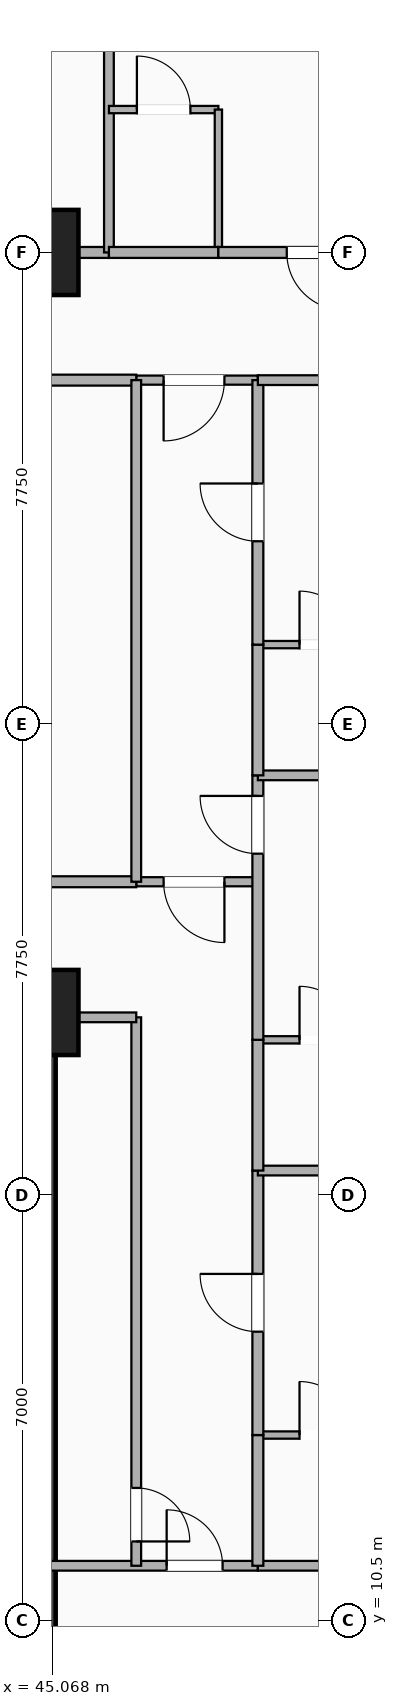
"""IFC4 building model, lengths in metres.
Left out: names, types, materials, properties, quantities, classifications, styles, units other than length and angle.
Written with IfcOpenShell. Run it as: python <this file> out.ifc"""

import sys

from ifc_helpers import new_model, si_unit, direction, frame, frame_2d, origin, origin_2d, place, context, subcontext, project, spatial, rectangle, extrude, element, fill, save


model = new_model("IFC4")
c1 = context("Model", 3, precision=1e-05, world=origin(), true_north=direction((0.0, 1.0)))
c2 = subcontext(c1, "Body", "Model", "MODEL_VIEW")
j1 = project(units=[si_unit("LENGTHUNIT", "METRE"), si_unit("PLANEANGLEUNIT", "RADIAN")], contexts=[c1])
p1 = place(None, origin())
s1 = spatial("IfcSite", under=j1, at=p1, CompositionType="ELEMENT")
p2 = place(p1, origin())
s2 = spatial("IfcBuilding", under=s1, at=p2, CompositionType="ELEMENT")
p3 = place(p2, frame((0.0, 0.0, 50.9)))
s3 = spatial("IfcBuildingStorey", under=s2, at=p3, CompositionType="ELEMENT", Elevation=50.9)
p4 = place(p3, frame((44.8, 3.5, 0.0), z_axis=(0.0, 0.0, 1.0), x_axis=(0.0, 1.0, 0.0)))
e1 = element("IfcWall", 1, at=p4, inside=s3, PredefinedType="SHEAR", context=c2, shape_type="SweptSolid", body=[
    extrude(rectangle(XDim=16.9, YDim=0.65, at=frame_2d((8.45, 0.0))), origin(), (0.0, 0.0, 1.0), 3.22),
])
for number, where, z_axis, x_axis in (
    (2, (44.8, 20.5, -0.28), (0.0, 0.0, 1.0), (1.0, 0.0, 0.0)),
    (3, (44.8, 33.0, -0.28), (0.0, 0.0, 1.0), (1.0, 0.0, 0.0)),
):
    element("IfcColumn", number, at=place(p3, frame(where, z_axis=z_axis, x_axis=x_axis)), inside=s3, PredefinedType="COLUMN", context=c2, shape_type="SweptSolid", body=[
        extrude(rectangle(XDim=1.4, YDim=1.4, at=origin_2d()), origin(), (0.0, 0.0, 1.0), 3.5),
    ])
p5 = place(p3, frame((44.8, 11.4, 0.0), z_axis=(0.0, 0.0, 1.0), x_axis=(1.0, 0.0, 0.0)))
e4 = element("IfcWall", 4, at=p5, inside=s3, PredefinedType="PARTITIONING", context=c2, shape_type="SweptSolid", body=[
    extrude(rectangle(XDim=3.65, YDim=0.16, at=frame_2d((1.825, 0.0))), origin(), (0.0, 0.0, 1.0), 2.51),
])
p6 = place(p5, frame((3.07, 0.0, 0.0), z_axis=(0.0, 0.0, 1.0), x_axis=(-1.0, 0.0, 0.0)))
e5 = element("IfcOpeningElement", 5, at=p6, cuts=e4, PredefinedType="OPENING", context=c2, shape_type="SweptSolid", body=[
    extrude(rectangle(XDim=0.92, YDim=2.08, at=frame_2d((0.46, 1.04))), frame((0.0, 0.09, 0.0), z_axis=(0.0, -1.0, 0.0), x_axis=(1.0, 0.0, 0.0)), (0.0, 0.0, 1.0), 0.18),
])
p7 = place(p3, frame((46.45, 11.4, 0.0), z_axis=(0.0, 0.0, 1.0), x_axis=(0.0, 1.0, 0.0)))
e6 = element("IfcWall", 6, at=p7, inside=s3, PredefinedType="PARTITIONING", context=c2, shape_type="SweptSolid", body=[
    extrude(rectangle(XDim=9.02, YDim=0.16, at=frame_2d((4.51, 0.0))), origin(), (0.0, 0.0, 1.0), 2.51),
])
p8 = place(p7, frame((0.4, 0.0, 0.0)))
e7 = element("IfcOpeningElement", 7, at=p8, cuts=e6, PredefinedType="OPENING", context=c2, shape_type="SweptSolid", body=[
    extrude(rectangle(XDim=0.88, YDim=2.08, at=frame_2d((0.44, 1.04))), frame((0.0, 0.09, 0.0), z_axis=(0.0, -1.0, 0.0), x_axis=(1.0, 0.0, 0.0)), (0.0, 0.0, 1.0), 0.18),
])
p9 = place(p3, frame((44.8, 20.42, 0.0), z_axis=(0.0, 0.0, 1.0), x_axis=(1.0, 0.0, 0.0)))
e8 = element("IfcWall", 8, at=p9, inside=s3, PredefinedType="PARTITIONING", context=c2, shape_type="SweptSolid", body=[
    extrude(rectangle(XDim=1.65, YDim=0.16, at=frame_2d((0.825, 0.0))), origin(), (0.0, 0.0, 1.0), 2.51),
])
p10 = place(p3, frame((46.45, 22.65, 0.0), z_axis=(0.0, 0.0, 1.0), x_axis=(1.0, 0.0, 0.0)))
e9 = element("IfcWall", 9, at=p10, inside=s3, PredefinedType="PARTITIONING", context=c2, shape_type="SweptSolid", body=[
    extrude(rectangle(XDim=2.0, YDim=0.15, at=frame_2d((1.0, 0.0))), origin(), (0.0, 0.0, 1.0), 3.22),
])
p11 = place(p10, frame((0.45, 0.0, 0.0)))
e10 = element("IfcOpeningElement", 10, at=p11, cuts=e9, PredefinedType="OPENING", context=c2, shape_type="SweptSolid", body=[
    extrude(rectangle(XDim=1.0, YDim=2.15, at=frame_2d((0.5, 1.075))), frame((0.0, 0.085, 0.0), z_axis=(0.0, -1.0, 0.0), x_axis=(1.0, 0.0, 0.0)), (0.0, 0.0, 1.0), 0.17),
])
p12 = place(p3, frame((46.45, 30.9, 0.0), z_axis=(0.0, 0.0, 1.0), x_axis=(1.0, 0.0, 0.0)))
e11 = element("IfcWall", 11, at=p12, inside=s3, PredefinedType="PARTITIONING", context=c2, shape_type="SweptSolid", body=[
    extrude(rectangle(XDim=2.0, YDim=0.15, at=frame_2d((1.0, 0.0))), origin(), (0.0, 0.0, 1.0), 3.22),
])
p13 = place(p12, frame((0.45, 0.0, 0.0)))
e12 = element("IfcOpeningElement", 12, at=p13, cuts=e11, PredefinedType="OPENING", context=c2, shape_type="SweptSolid", body=[
    extrude(rectangle(XDim=1.0, YDim=2.15, at=frame_2d((0.5, 1.075))), frame((0.0, 0.085, 0.0), z_axis=(0.0, -1.0, 0.0), x_axis=(1.0, 0.0, 0.0)), (0.0, 0.0, 1.0), 0.17),
])
p14 = place(p3, frame((40.9, 22.65, 0.0), z_axis=(0.0, 0.0, 1.0), x_axis=(1.0, 0.0, 0.0)))
e13 = element("IfcWall", 13, at=p14, inside=s3, PredefinedType="PARTITIONING", context=c2, shape_type="SweptSolid", body=[
    extrude(rectangle(XDim=5.55, YDim=0.18, at=frame_2d((2.775, 0.0))), origin(), (0.0, 0.0, 1.0), 2.51),
])
p15 = place(p14, frame((2.3, 0.0, 0.0)))
e14 = element("IfcOpeningElement", 14, at=p15, cuts=e13, PredefinedType="OPENING", context=c2, shape_type="SweptSolid", body=[
    extrude(rectangle(XDim=0.95, YDim=2.15, at=frame_2d((0.475, 1.075))), frame((0.0, 0.1, 0.0), z_axis=(0.0, -1.0, 0.0), x_axis=(1.0, 0.0, 0.0)), (0.0, 0.0, 1.0), 0.2),
])
p16 = place(p3, frame((40.9, 30.9, 0.0), z_axis=(0.0, 0.0, 1.0), x_axis=(1.0, 0.0, 0.0)))
e15 = element("IfcWall", 15, at=p16, inside=s3, PredefinedType="PARTITIONING", context=c2, shape_type="SweptSolid", body=[
    extrude(rectangle(XDim=5.55, YDim=0.18, at=frame_2d((2.775, 0.0))), origin(), (0.0, 0.0, 1.0), 2.51),
])
p17 = place(p3, frame((46.45, 22.65, 0.0), z_axis=(0.0, 0.0, 1.0), x_axis=(0.0, 1.0, 0.0)))
e16 = element("IfcWall", 16, at=p17, inside=s3, PredefinedType="PARTITIONING", context=c2, shape_type="SweptSolid", body=[
    extrude(rectangle(XDim=8.25, YDim=0.16, at=frame_2d((4.125, 0.0))), origin(), (0.0, 0.0, 1.0), 2.788),
])
p18 = place(p3, frame((38.273, 33.0, 0.0), z_axis=(0.0, 0.0, 1.0), x_axis=(1.0, 0.0, 0.0)))
e17 = element("IfcWall", 17, at=p18, inside=s3, PredefinedType="PARTITIONING", context=c2, shape_type="SweptSolid", body=[
    extrude(rectangle(XDim=7.728, YDim=0.18, at=frame_2d((3.864, 0.0))), origin(), (0.0, 0.0, 1.0), 2.51),
])
p19 = place(p18, frame((3.389, 0.0, 0.0)))
e18 = element("IfcOpeningElement", 18, at=p19, cuts=e17, PredefinedType="OPENING", context=c2, shape_type="SweptSolid", body=[
    extrude(rectangle(XDim=0.95, YDim=2.15, at=frame_2d((0.475, 1.075))), frame((0.0, 0.1, 0.0), z_axis=(0.0, -1.0, 0.0), x_axis=(1.0, 0.0, 0.0)), (0.0, 0.0, 1.0), 0.2),
])
p20 = place(p3, frame((46.001, 33.0, 0.0), z_axis=(0.0, 0.0, 1.0), x_axis=(0.0, 1.0, 0.0)))
e19 = element("IfcWall", 19, at=p20, inside=s3, PredefinedType="PARTITIONING", context=c2, shape_type="SweptSolid", body=[
    extrude(rectangle(XDim=15.38, YDim=0.16, at=frame_2d((7.69, 0.0))), origin(), (0.0, 0.0, 1.0), 2.51),
])
p21 = place(p3, frame((46.001, 35.35, 0.0), z_axis=(0.0, 0.0, 1.0), x_axis=(1.0, 0.0, 0.0)))
e20 = element("IfcWall", 20, at=p21, inside=s3, PredefinedType="PARTITIONING", context=c2, shape_type="SweptSolid", body=[
    extrude(rectangle(XDim=1.8, YDim=0.12, at=frame_2d((0.9, 0.0))), origin(), (0.0, 0.0, 1.0), 3.22),
])
p22 = place(p21, frame((1.34, 0.0, 0.0), z_axis=(0.0, 0.0, 1.0), x_axis=(-1.0, 0.0, 0.0)))
e21 = element("IfcOpeningElement", 21, at=p22, cuts=e20, PredefinedType="OPENING", context=c2, shape_type="SweptSolid", body=[
    extrude(rectangle(XDim=0.88, YDim=2.08, at=frame_2d((0.44, 1.04))), frame((0.0, 0.07, 0.0), z_axis=(0.0, -1.0, 0.0), x_axis=(1.0, 0.0, 0.0)), (0.0, 0.0, 1.0), 0.14),
])
p23 = place(p3, frame((47.801, 33.0, 0.0), z_axis=(0.0, 0.0, 1.0), x_axis=(0.0, 1.0, 0.0)))
e22 = element("IfcWall", 22, at=p23, inside=s3, PredefinedType="PARTITIONING", context=c2, shape_type="SweptSolid", body=[
    extrude(rectangle(XDim=2.35, YDim=0.12, at=frame_2d((1.175, 0.0))), origin(), (0.0, 0.0, 1.0), 2.51),
])
p24 = place(p3, frame((46.001, 33.0, 0.0), z_axis=(0.0, 0.0, 1.0), x_axis=(1.0, 0.0, 0.0)))
e23 = element("IfcWall", 23, at=p24, inside=s3, PredefinedType="PARTITIONING", context=c2, shape_type="SweptSolid", body=[
    extrude(rectangle(XDim=1.8, YDim=0.18, at=frame_2d((0.9, 0.0))), origin(), (0.0, 0.0, 1.0), 2.51),
])
p25 = place(p3, frame((47.801, 33.0, 0.0), z_axis=(0.0, 0.0, 1.0), x_axis=(1.0, 0.0, 0.0)))
e24 = element("IfcWall", 24, at=p25, inside=s3, PredefinedType="PARTITIONING", context=c2, shape_type="SweptSolid", body=[
    extrude(rectangle(XDim=3.199, YDim=0.18, at=frame_2d((1.6, 0.0))), origin(), (0.0, 0.0, 1.0), 2.51),
])
p26 = place(p25, frame((1.125, 0.0, 0.0)))
e25 = element("IfcOpeningElement", 25, at=p26, cuts=e24, PredefinedType="OPENING", context=c2, shape_type="SweptSolid", body=[
    extrude(rectangle(XDim=0.95, YDim=2.15, at=frame_2d((0.475, 1.075))), frame((0.0, 0.1, 0.0), z_axis=(0.0, -1.0, 0.0), x_axis=(1.0, 0.0, 0.0)), (0.0, 0.0, 1.0), 0.2),
])
p27 = place(p3, frame((48.45, 11.4, 0.0), z_axis=(0.0, 0.0, 1.0), x_axis=(1.0, 0.0, 0.0)))
e26 = element("IfcWall", 26, at=p27, inside=s3, PredefinedType="PARTITIONING", context=c2, shape_type="SweptSolid", body=[
    extrude(rectangle(XDim=13.23, YDim=0.16, at=frame_2d((6.615, 0.0))), origin(), (0.0, 0.0, 1.0), 2.583),
])
p28 = place(p3, frame((48.45, 13.55, 0.0), z_axis=(0.0, 0.0, 1.0), x_axis=(1.0, 0.0, 0.0)))
e27 = element("IfcWall", 27, at=p28, inside=s3, PredefinedType="PARTITIONING", context=c2, shape_type="SweptSolid", body=[
    extrude(rectangle(XDim=2.25, YDim=0.12, at=frame_2d((1.125, 0.0))), origin(), (0.0, 0.0, 1.0), 3.22),
])
p29 = place(p28, frame((1.565, 0.0, 0.0), z_axis=(0.0, 0.0, 1.0), x_axis=(-1.0, 0.0, 0.0)))
e28 = element("IfcOpeningElement", 28, at=p29, cuts=e27, PredefinedType="OPENING", context=c2, shape_type="SweptSolid", body=[
    extrude(rectangle(XDim=0.88, YDim=2.08, at=frame_2d((0.44, 1.04))), frame((0.0, 0.07, 0.0), z_axis=(0.0, -1.0, 0.0), x_axis=(1.0, 0.0, 0.0)), (0.0, 0.0, 1.0), 0.14),
])
p30 = place(p3, frame((48.45, 11.4, 0.0), z_axis=(0.0, 0.0, 1.0), x_axis=(0.0, 1.0, 0.0)))
e29 = element("IfcWall", 29, at=p30, inside=s3, PredefinedType="PARTITIONING", context=c2, shape_type="SweptSolid", body=[
    extrude(rectangle(XDim=2.15, YDim=0.18, at=frame_2d((1.075, 0.0))), origin(), (0.0, 0.0, 1.0), 3.22),
])
p31 = place(p3, frame((48.45, 13.55, 0.0), z_axis=(0.0, 0.0, 1.0), x_axis=(0.0, 1.0, 0.0)))
e30 = element("IfcWall", 30, at=p31, inside=s3, PredefinedType="PARTITIONING", context=c2, shape_type="SweptSolid", body=[
    extrude(rectangle(XDim=4.35, YDim=0.18, at=frame_2d((2.175, 0.0))), origin(), (0.0, 0.0, 1.0), 2.902),
])
p32 = place(p31, frame((2.65, 0.0, 0.0), z_axis=(0.0, 0.0, 1.0), x_axis=(-1.0, 0.0, 0.0)))
e31 = element("IfcOpeningElement", 31, at=p32, cuts=e30, PredefinedType="OPENING", context=c2, shape_type="SweptSolid", body=[
    extrude(rectangle(XDim=0.95, YDim=2.15, at=frame_2d((0.475, 1.075))), frame((0.0, 0.1, 0.0), z_axis=(0.0, -1.0, 0.0), x_axis=(1.0, 0.0, 0.0)), (0.0, 0.0, 1.0), 0.2),
])
p33 = place(p3, frame((48.45, 17.9, 0.0), z_axis=(0.0, 0.0, 1.0), x_axis=(1.0, 0.0, 0.0)))
e32 = element("IfcWall", 32, at=p33, inside=s3, PredefinedType="PARTITIONING", context=c2, shape_type="SweptSolid", body=[
    extrude(rectangle(XDim=13.23, YDim=0.16, at=frame_2d((6.615, 0.0))), origin(), (0.0, 0.0, 1.0), 2.583),
])
p34 = place(p3, frame((48.45, 20.05, 0.0), z_axis=(0.0, 0.0, 1.0), x_axis=(1.0, 0.0, 0.0)))
e33 = element("IfcWall", 33, at=p34, inside=s3, PredefinedType="PARTITIONING", context=c2, shape_type="SweptSolid", body=[
    extrude(rectangle(XDim=2.25, YDim=0.12, at=frame_2d((1.125, 0.0))), origin(), (0.0, 0.0, 1.0), 3.22),
])
p35 = place(p34, frame((1.565, 0.0, 0.0), z_axis=(0.0, 0.0, 1.0), x_axis=(-1.0, 0.0, 0.0)))
e34 = element("IfcOpeningElement", 34, at=p35, cuts=e33, PredefinedType="OPENING", context=c2, shape_type="SweptSolid", body=[
    extrude(rectangle(XDim=0.88, YDim=2.08, at=frame_2d((0.44, 1.04))), frame((0.0, 0.07, 0.0), z_axis=(0.0, -1.0, 0.0), x_axis=(1.0, 0.0, 0.0)), (0.0, 0.0, 1.0), 0.14),
])
p36 = place(p3, frame((48.45, 17.9, 0.0), z_axis=(0.0, 0.0, 1.0), x_axis=(0.0, 1.0, 0.0)))
e35 = element("IfcWall", 35, at=p36, inside=s3, PredefinedType="PARTITIONING", context=c2, shape_type="SweptSolid", body=[
    extrude(rectangle(XDim=2.15, YDim=0.18, at=frame_2d((1.075, 0.0))), origin(), (0.0, 0.0, 1.0), 3.22),
])
p37 = place(p3, frame((48.45, 20.05, 0.0), z_axis=(0.0, 0.0, 1.0), x_axis=(0.0, 1.0, 0.0)))
e36 = element("IfcWall", 36, at=p37, inside=s3, PredefinedType="PARTITIONING", context=c2, shape_type="SweptSolid", body=[
    extrude(rectangle(XDim=4.35, YDim=0.18, at=frame_2d((2.175, 0.0))), origin(), (0.0, 0.0, 1.0), 2.51),
])
p38 = place(p37, frame((4.011, 0.0, 0.0), z_axis=(0.0, 0.0, 1.0), x_axis=(-1.0, 0.0, 0.0)))
e37 = element("IfcOpeningElement", 37, at=p38, cuts=e36, PredefinedType="OPENING", context=c2, shape_type="SweptSolid", body=[
    extrude(rectangle(XDim=0.95, YDim=2.15, at=frame_2d((0.475, 1.075))), frame((0.0, 0.1, 0.0), z_axis=(0.0, -1.0, 0.0), x_axis=(1.0, 0.0, 0.0)), (0.0, 0.0, 1.0), 0.2),
])
p39 = place(p3, frame((48.45, 24.4, 0.0), z_axis=(0.0, 0.0, 1.0), x_axis=(1.0, 0.0, 0.0)))
e38 = element("IfcWall", 38, at=p39, inside=s3, PredefinedType="PARTITIONING", context=c2, shape_type="SweptSolid", body=[
    extrude(rectangle(XDim=13.23, YDim=0.16, at=frame_2d((6.615, 0.0))), origin(), (0.0, 0.0, 1.0), 2.583),
])
p40 = place(p3, frame((48.45, 26.55, 0.0), z_axis=(0.0, 0.0, 1.0), x_axis=(1.0, 0.0, 0.0)))
e39 = element("IfcWall", 39, at=p40, inside=s3, PredefinedType="PARTITIONING", context=c2, shape_type="SweptSolid", body=[
    extrude(rectangle(XDim=2.25, YDim=0.12, at=frame_2d((1.125, 0.0))), origin(), (0.0, 0.0, 1.0), 3.22),
])
p41 = place(p40, frame((1.565, 0.0, 0.0), z_axis=(0.0, 0.0, 1.0), x_axis=(-1.0, 0.0, 0.0)))
e40 = element("IfcOpeningElement", 40, at=p41, cuts=e39, PredefinedType="OPENING", context=c2, shape_type="SweptSolid", body=[
    extrude(rectangle(XDim=0.88, YDim=2.08, at=frame_2d((0.44, 1.04))), frame((0.0, 0.07, 0.0), z_axis=(0.0, -1.0, 0.0), x_axis=(1.0, 0.0, 0.0)), (0.0, 0.0, 1.0), 0.14),
])
p42 = place(p3, frame((48.45, 24.4, 0.0), z_axis=(0.0, 0.0, 1.0), x_axis=(0.0, 1.0, 0.0)))
e41 = element("IfcWall", 41, at=p42, inside=s3, PredefinedType="PARTITIONING", context=c2, shape_type="SweptSolid", body=[
    extrude(rectangle(XDim=2.15, YDim=0.18, at=frame_2d((1.075, 0.0))), origin(), (0.0, 0.0, 1.0), 2.788),
])
p43 = place(p3, frame((48.45, 26.55, 0.0), z_axis=(0.0, 0.0, 1.0), x_axis=(0.0, 1.0, 0.0)))
e42 = element("IfcWall", 42, at=p43, inside=s3, PredefinedType="PARTITIONING", context=c2, shape_type="SweptSolid", body=[
    extrude(rectangle(XDim=4.35, YDim=0.18, at=frame_2d((2.175, 0.0))), origin(), (0.0, 0.0, 1.0), 2.788),
])
p44 = place(p43, frame((2.65, 0.0, 0.0), z_axis=(0.0, 0.0, 1.0), x_axis=(-1.0, 0.0, 0.0)))
e43 = element("IfcOpeningElement", 43, at=p44, cuts=e42, PredefinedType="OPENING", context=c2, shape_type="SweptSolid", body=[
    extrude(rectangle(XDim=0.95, YDim=2.15, at=frame_2d((0.475, 1.075))), frame((0.0, 0.1, 0.0), z_axis=(0.0, -1.0, 0.0), x_axis=(1.0, 0.0, 0.0)), (0.0, 0.0, 1.0), 0.2),
])
p45 = place(p3, frame((48.45, 30.9, 0.0), z_axis=(0.0, 0.0, 1.0), x_axis=(1.0, 0.0, 0.0)))
e44 = element("IfcWall", 44, at=p45, inside=s3, PredefinedType="PARTITIONING", context=c2, shape_type="SweptSolid", body=[
    extrude(rectangle(XDim=13.23, YDim=0.16, at=frame_2d((6.615, 0.0))), origin(), (0.0, 0.0, 1.0), 2.583),
])
p46 = place(p6, origin())
e45 = element("IfcDoor", 45, at=p46, inside=s3, OperationType="SINGLE_SWING_LEFT", PredefinedType="DOOR", context=c2, shape_type="SweptSolid", body=[
    extrude(rectangle(XDim=0.92, YDim=2.08, at=frame_2d((0.46, 1.04))), frame((0.0, 0.025, 0.0), z_axis=(0.0, -1.0, 0.0), x_axis=(1.0, 0.0, 0.0)), (0.0, 0.0, 1.0), 0.05),
])
fill(e5, e45)
p47 = place(p8, origin())
e46 = element("IfcDoor", 46, at=p47, inside=s3, OperationType="SINGLE_SWING_LEFT", PredefinedType="DOOR", context=c2, shape_type="SweptSolid", body=[
    extrude(rectangle(XDim=0.88, YDim=2.08, at=frame_2d((0.44, 1.04))), frame((0.0, 0.025, 0.0), z_axis=(0.0, -1.0, 0.0), x_axis=(1.0, 0.0, 0.0)), (0.0, 0.0, 1.0), 0.05),
])
fill(e7, e46)
p48 = place(p11, origin())
e47 = element("IfcDoor", 47, at=p48, inside=s3, OperationType="SINGLE_SWING_RIGHT", PredefinedType="DOOR", context=c2, shape_type="SweptSolid", body=[
    extrude(rectangle(XDim=1.0, YDim=2.15, at=frame_2d((0.5, 1.075))), frame((0.0, 0.025, 0.0), z_axis=(0.0, -1.0, 0.0), x_axis=(1.0, 0.0, 0.0)), (0.0, 0.0, 1.0), 0.05),
])
fill(e10, e47)
p49 = place(p13, origin())
e48 = element("IfcDoor", 48, at=p49, inside=s3, OperationType="SINGLE_SWING_LEFT", PredefinedType="DOOR", context=c2, shape_type="SweptSolid", body=[
    extrude(rectangle(XDim=1.0, YDim=2.15, at=frame_2d((0.5, 1.075))), frame((0.0, 0.025, 0.0), z_axis=(0.0, -1.0, 0.0), x_axis=(1.0, 0.0, 0.0)), (0.0, 0.0, 1.0), 0.05),
])
fill(e12, e48)
p50 = place(p22, origin())
e49 = element("IfcDoor", 49, at=p50, inside=s3, OperationType="SINGLE_SWING_LEFT", PredefinedType="DOOR", context=c2, shape_type="SweptSolid", body=[
    extrude(rectangle(XDim=0.88, YDim=2.08, at=frame_2d((0.44, 1.04))), frame((0.0, 0.025, 0.0), z_axis=(0.0, -1.0, 0.0), x_axis=(1.0, 0.0, 0.0)), (0.0, 0.0, 1.0), 0.05),
])
fill(e21, e49)
p51 = place(p26, origin())
e50 = element("IfcDoor", 50, at=p51, inside=s3, OperationType="SINGLE_SWING_RIGHT", PredefinedType="DOOR", context=c2, shape_type="SweptSolid", body=[
    extrude(rectangle(XDim=0.95, YDim=2.15, at=frame_2d((0.475, 1.075))), frame((0.0, 0.025, 0.0), z_axis=(0.0, -1.0, 0.0), x_axis=(1.0, 0.0, 0.0)), (0.0, 0.0, 1.0), 0.05),
])
fill(e25, e50)
p52 = place(p29, origin())
e51 = element("IfcDoor", 51, at=p52, inside=s3, OperationType="SINGLE_SWING_LEFT", PredefinedType="DOOR", context=c2, shape_type="SweptSolid", body=[
    extrude(rectangle(XDim=0.88, YDim=2.08, at=frame_2d((0.44, 1.04))), frame((0.0, 0.025, 0.0), z_axis=(0.0, -1.0, 0.0), x_axis=(1.0, 0.0, 0.0)), (0.0, 0.0, 1.0), 0.05),
])
fill(e28, e51)
p53 = place(p32, origin())
e52 = element("IfcDoor", 52, at=p53, inside=s3, OperationType="SINGLE_SWING_RIGHT", PredefinedType="DOOR", context=c2, shape_type="SweptSolid", body=[
    extrude(rectangle(XDim=0.95, YDim=2.15, at=frame_2d((0.475, 1.075))), frame((0.0, 0.025, 0.0), z_axis=(0.0, -1.0, 0.0), x_axis=(1.0, 0.0, 0.0)), (0.0, 0.0, 1.0), 0.05),
])
fill(e31, e52)
p54 = place(p35, origin())
e53 = element("IfcDoor", 53, at=p54, inside=s3, OperationType="SINGLE_SWING_LEFT", PredefinedType="DOOR", context=c2, shape_type="SweptSolid", body=[
    extrude(rectangle(XDim=0.88, YDim=2.08, at=frame_2d((0.44, 1.04))), frame((0.0, 0.025, 0.0), z_axis=(0.0, -1.0, 0.0), x_axis=(1.0, 0.0, 0.0)), (0.0, 0.0, 1.0), 0.05),
])
fill(e34, e53)
p55 = place(p38, origin())
e54 = element("IfcDoor", 54, at=p55, inside=s3, OperationType="SINGLE_SWING_RIGHT", PredefinedType="DOOR", context=c2, shape_type="SweptSolid", body=[
    extrude(rectangle(XDim=0.95, YDim=2.15, at=frame_2d((0.475, 1.075))), frame((0.0, 0.025, 0.0), z_axis=(0.0, -1.0, 0.0), x_axis=(1.0, 0.0, 0.0)), (0.0, 0.0, 1.0), 0.05),
])
fill(e37, e54)
p56 = place(p41, origin())
e55 = element("IfcDoor", 55, at=p56, inside=s3, OperationType="SINGLE_SWING_LEFT", PredefinedType="DOOR", context=c2, shape_type="SweptSolid", body=[
    extrude(rectangle(XDim=0.88, YDim=2.08, at=frame_2d((0.44, 1.04))), frame((0.0, 0.025, 0.0), z_axis=(0.0, -1.0, 0.0), x_axis=(1.0, 0.0, 0.0)), (0.0, 0.0, 1.0), 0.05),
])
fill(e40, e55)
p57 = place(p44, origin())
e56 = element("IfcDoor", 56, at=p57, inside=s3, OperationType="SINGLE_SWING_RIGHT", PredefinedType="DOOR", context=c2, shape_type="SweptSolid", body=[
    extrude(rectangle(XDim=0.95, YDim=2.15, at=frame_2d((0.475, 1.075))), frame((0.0, 0.025, 0.0), z_axis=(0.0, -1.0, 0.0), x_axis=(1.0, 0.0, 0.0)), (0.0, 0.0, 1.0), 0.05),
])
fill(e43, e56)
save(model, sys.argv[1])
